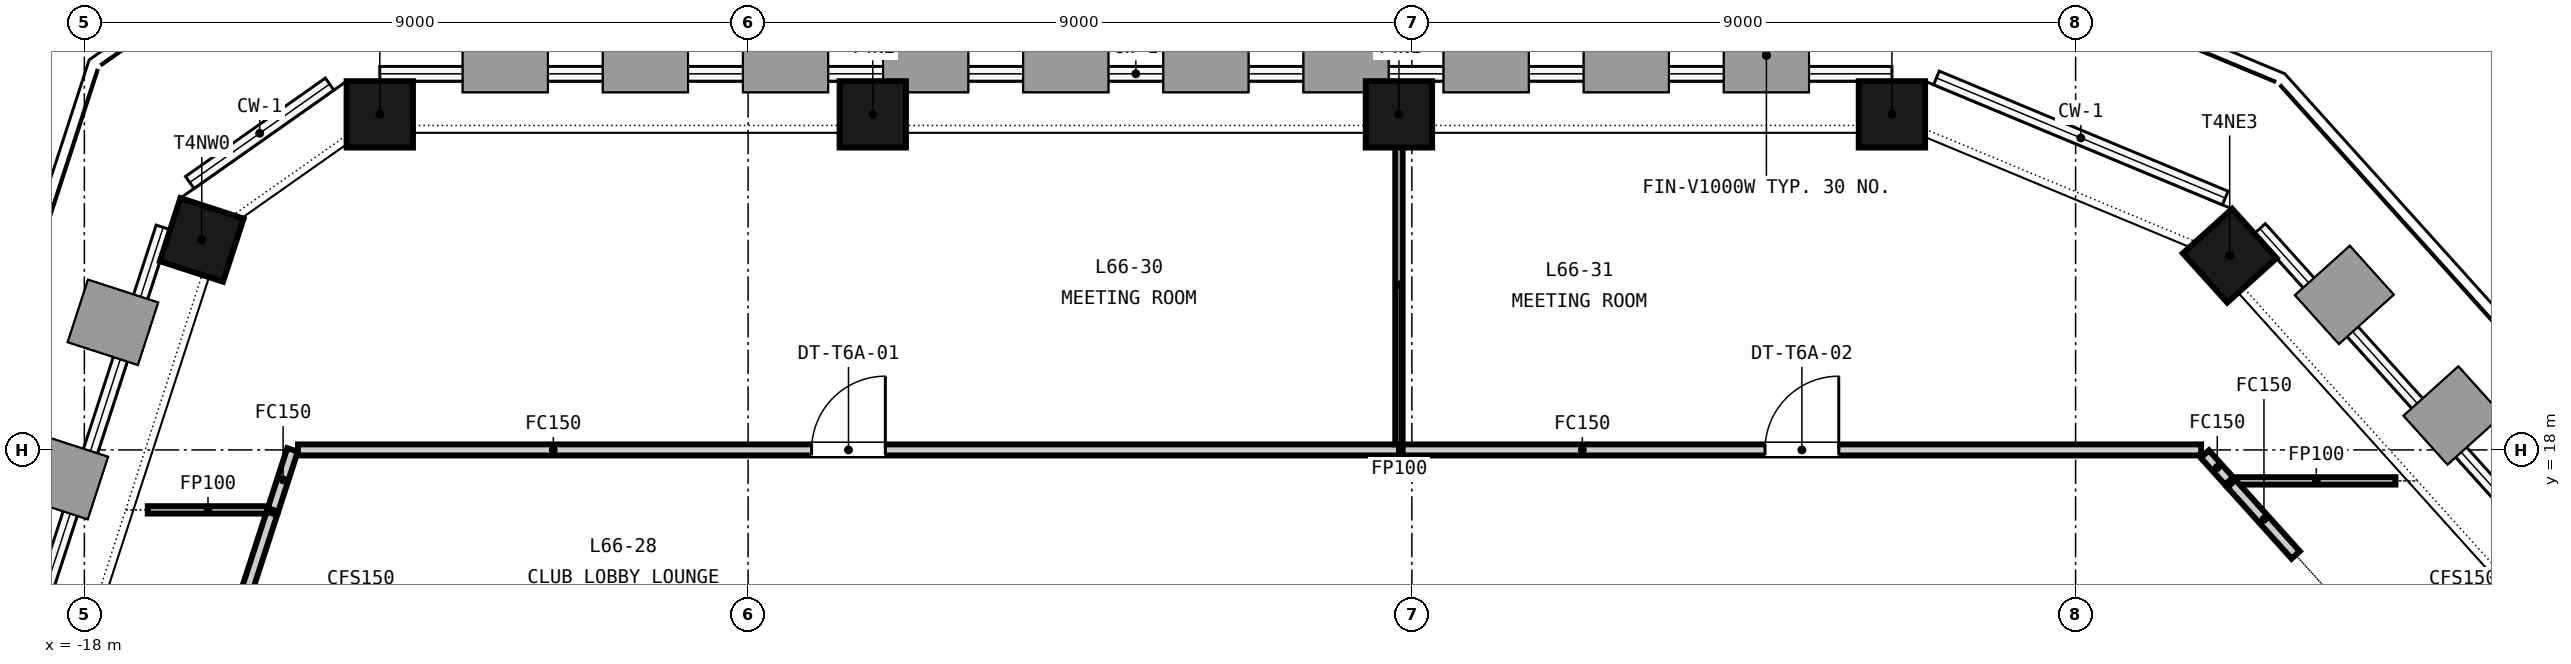
"""IFC4 building model, lengths in metres.
Left out: names, types, materials, properties, quantities, classifications, styles, units other than length and angle.
Written with IfcOpenShell. Run it as: python <this file> out.ifc"""

import sys

from ifc_helpers import new_model, si_unit, direction, frame, frame_2d, origin, origin_2d, place, context, subcontext, project, spatial, rectangle, extrude, element, fill, save


model = new_model("IFC4")
c1 = context("Model", 3, precision=1e-05, world=origin(), true_north=direction((0.0, 1.0)))
c2 = subcontext(c1, "Body", "Model", "MODEL_VIEW")
j1 = project(units=[si_unit("LENGTHUNIT", "METRE"), si_unit("PLANEANGLEUNIT", "RADIAN")], contexts=[c1])
p1 = place(None, origin())
s1 = spatial("IfcSite", under=j1, at=p1, CompositionType="ELEMENT")
p2 = place(p1, origin())
s2 = spatial("IfcBuilding", under=s1, at=p2, CompositionType="ELEMENT")
p3 = place(p2, frame((0.0, 0.0, 260.95)))
s3 = spatial("IfcBuildingStorey", under=s2, at=p3, CompositionType="ELEMENT", Elevation=260.95)
for number, where, z_axis, x_axis in (
    (1, (6.51, 22.55, -0.15), (0.0, 0.0, 1.0), (-1.0, 0.0, 0.0)),
    (2, (-0.175, 22.55, -0.15), (0.0, 0.0, 1.0), (-1.0, 0.0, 0.0)),
    (3, (-7.31, 22.55, -0.15), (0.0, 0.0, 1.0), (-1.0, 0.0, 0.0)),
    (4, (-13.994, 22.55, -0.15), (0.0, 0.0, 1.0), (-1.0, 0.0, 0.0)),
    (5, (-16.408, 20.848, -0.15), (0.0, 0.0, 1.0), (-0.309, -0.951, 0.0)),
    (6, (11.089, 20.633, -0.15), (0.0, 0.0, 1.0), (-0.669, 0.743, 0.0)),
):
    element("IfcColumn", number, at=place(p3, frame(where, z_axis=z_axis, x_axis=x_axis)), inside=s3, PredefinedType="COLUMN", context=c2, shape_type="SweptSolid", body=[
        extrude(rectangle(XDim=0.9, YDim=0.9, at=origin_2d()), origin(), (0.0, 0.0, 1.0), 3.65),
    ])
p4 = place(p3, frame((-15.442, 17.187, 0.0), z_axis=(0.0, 0.0, 1.0), x_axis=(0.308763129345, 0.951138964588, 0.0)))
e7 = element("IfcWall", 7, at=p4, inside=s3, PredefinedType="PARTITIONING", context=c2, shape_type="SweptSolid", body=[
    extrude(rectangle(XDim=0.855, YDim=0.15, at=frame_2d((0.427, 0.0))), origin(), (0.0, 0.0, 1.0), 2.751),
])
p5 = place(p3, frame((-15.103, 18.0, 0.0), z_axis=(0.0, 0.0, 1.0), x_axis=(1.0, 0.0, 0.0)))
e8 = element("IfcWall", 8, at=p5, inside=s3, PredefinedType="PARTITIONING", context=c2, shape_type="SweptSolid", body=[
    extrude(rectangle(XDim=14.928, YDim=0.15, at=frame_2d((7.464, 0.0))), origin(), (0.0, 0.0, 1.0), 2.751),
])
p6 = place(p5, frame((6.964, 0.0, 0.0)))
e9 = element("IfcOpeningElement", 9, at=p6, cuts=e8, PredefinedType="OPENING", context=c2, shape_type="SweptSolid", body=[
    extrude(rectangle(XDim=1.0, YDim=2.1, at=frame_2d((0.5, 1.05))), frame((0.0, 0.085, 0.0), z_axis=(0.0, -1.0, 0.0), x_axis=(1.0, 0.0, 0.0)), (0.0, 0.0, 1.0), 0.17),
])
p7 = place(p3, frame((-0.175, 18.075, 0.0), z_axis=(0.0, 0.0, 1.0), x_axis=(0.0, 1.0, 0.0)))
e10 = element("IfcWall", 10, at=p7, inside=s3, PredefinedType="PARTITIONING", context=c2, shape_type="SweptSolid", body=[
    extrude(rectangle(XDim=4.325, YDim=0.1, at=frame_2d((2.163, 0.0))), origin(), (0.0, 0.0, 1.0), 2.751),
])
p8 = place(p3, frame((-17.14, 17.187, 0.0), z_axis=(0.0, 0.0, 1.0), x_axis=(1.0, 0.0, 0.0)))
e11 = element("IfcWall", 11, at=p8, inside=s3, PredefinedType="PARTITIONING", context=c2, shape_type="SweptSolid", body=[
    extrude(rectangle(XDim=1.623, YDim=0.1, at=frame_2d((0.812, 0.0))), origin(), (0.0, 0.0, 1.0), 2.751),
])
p9 = place(p3, frame((-0.125, 18.0, 0.0), z_axis=(0.0, 0.0, 1.0), x_axis=(1.0, 0.0, 0.0)))
e12 = element("IfcWall", 12, at=p9, inside=s3, PredefinedType="PARTITIONING", context=c2, shape_type="SweptSolid", body=[
    extrude(rectangle(XDim=10.827, YDim=0.15, at=frame_2d((5.414, 0.0))), origin(), (0.0, 0.0, 1.0), 2.751),
])
p10 = place(p9, frame((4.914, 0.0, 0.0)))
e13 = element("IfcOpeningElement", 13, at=p10, cuts=e12, PredefinedType="OPENING", context=c2, shape_type="SweptSolid", body=[
    extrude(rectangle(XDim=1.0, YDim=2.1, at=frame_2d((0.5, 1.05))), frame((0.0, 0.085, 0.0), z_axis=(0.0, -1.0, 0.0), x_axis=(1.0, 0.0, 0.0)), (0.0, 0.0, 1.0), 0.17),
])
p11 = place(p3, frame((10.752, 17.944, 0.0), z_axis=(0.0, 0.0, 1.0), x_axis=(0.669019774343, -0.74324460411, 0.0)))
e14 = element("IfcWall", 14, at=p11, inside=s3, PredefinedType="PARTITIONING", context=c2, shape_type="SweptSolid", body=[
    extrude(rectangle(XDim=0.49, YDim=0.15, at=frame_2d((0.245, 0.0))), origin(), (0.0, 0.0, 1.0), 2.751),
])
p12 = place(p3, frame((11.181, 17.58, 0.0), z_axis=(0.0, 0.0, 1.0), x_axis=(1.0, 0.0, 0.0)))
e15 = element("IfcWall", 15, at=p12, inside=s3, PredefinedType="PARTITIONING", context=c2, shape_type="SweptSolid", body=[
    extrude(rectangle(XDim=2.156, YDim=0.1, at=frame_2d((1.078, 0.0))), origin(), (0.0, 0.0, 1.0), 2.751),
])
p13 = place(p3, frame((11.114, 17.543, 0.0), z_axis=(0.0, 0.0, 1.0), x_axis=(0.669172057426, -0.743107500675, 0.0)))
e16 = element("IfcWall", 16, at=p13, inside=s3, PredefinedType="PARTITIONING", context=c2, shape_type="SweptSolid", body=[
    extrude(rectangle(XDim=1.301, YDim=0.15, at=frame_2d((0.65, 0.0))), origin(), (0.0, 0.0, 1.0), 2.751),
])
p14 = place(p3, frame((-17.377, 11.232, 0.0), z_axis=(0.0, 0.0, 1.0), x_axis=(0.309001632963, 0.951061507383, 0.0)))
e17 = element("IfcWall", 17, at=p14, inside=s3, PredefinedType="PARTITIONING", context=c2, shape_type="SweptSolid", body=[
    extrude(rectangle(XDim=6.211, YDim=0.15, at=frame_2d((3.105, 0.0))), origin(), (0.0, 0.0, 1.0), 2.751),
])
p15 = place(p6, origin())
e18 = element("IfcDoor", 18, at=p15, inside=s3, OperationType="SINGLE_SWING_RIGHT", PredefinedType="DOOR", context=c2, shape_type="SweptSolid", body=[
    extrude(rectangle(XDim=1.0, YDim=2.1, at=frame_2d((0.5, 1.05))), frame((0.0, 0.025, 0.0), z_axis=(0.0, -1.0, 0.0), x_axis=(1.0, 0.0, 0.0)), (0.0, 0.0, 1.0), 0.05),
])
fill(e9, e18)
p16 = place(p10, origin())
e19 = element("IfcDoor", 19, at=p16, inside=s3, OperationType="SINGLE_SWING_RIGHT", PredefinedType="DOOR", context=c2, shape_type="SweptSolid", body=[
    extrude(rectangle(XDim=1.0, YDim=2.1, at=frame_2d((0.5, 1.05))), frame((0.0, 0.025, 0.0), z_axis=(0.0, -1.0, 0.0), x_axis=(1.0, 0.0, 0.0)), (0.0, 0.0, 1.0), 0.05),
])
fill(e13, e19)
save(model, sys.argv[1])
